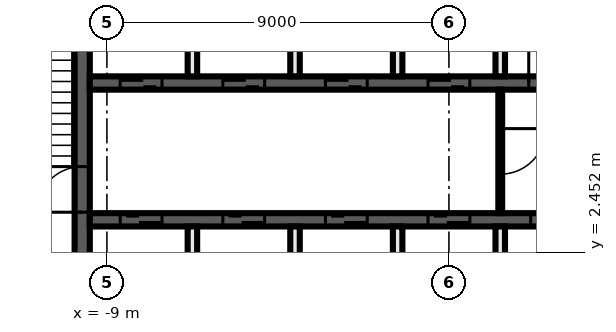
"""IFC4 building model, lengths in metres.
Left out: names, types, materials, properties, quantities, classifications, styles, units other than length and angle.
Written with IfcOpenShell. Run it as: python <this file> out.ifc"""

import sys

from ifc_helpers import new_model, si_unit, direction, frame, frame_2d, origin, place, context, subcontext, project, spatial, rectangle, extrude, element, fill, save


model = new_model("IFC4")
c1 = context("Model", 3, precision=1e-05, world=origin(), true_north=direction((0.0, 1.0)))
c2 = subcontext(c1, "Body", "Model", "MODEL_VIEW")
j1 = project(units=[si_unit("LENGTHUNIT", "METRE"), si_unit("PLANEANGLEUNIT", "RADIAN")], contexts=[c1])
p1 = place(None, origin())
s1 = spatial("IfcSite", under=j1, at=p1, CompositionType="ELEMENT")
p2 = place(p1, origin())
s2 = spatial("IfcBuilding", under=s1, at=p2, CompositionType="ELEMENT")
p3 = place(p2, frame((0.0, 0.0, 84.7)))
s3 = spatial("IfcBuildingStorey", under=s2, at=p3, CompositionType="ELEMENT", Elevation=84.7)
p4 = place(p3, frame((-9.65, 2.3, 0.0), z_axis=(0.0, 0.0, 1.0), x_axis=(0.0, 1.0, 0.0)))
e1 = element("IfcWall", 1, at=p4, inside=s3, PredefinedType="SHEAR", context=c2, shape_type="SweptSolid", body=[
    extrude(rectangle(XDim=7.5, YDim=0.4, at=frame_2d((3.75, 0.0))), origin(), (0.0, 0.0, 1.0), 3.9),
])
p5 = place(p4, frame((1.2, 0.0, 0.0)))
e2 = element("IfcOpeningElement", 2, at=p5, cuts=e1, PredefinedType="OPENING", context=c2, shape_type="SweptSolid", body=[
    extrude(rectangle(XDim=1.2, YDim=2.1, at=frame_2d((0.6, 1.05))), frame((0.0, 0.21, 0.0), z_axis=(0.0, -1.0, 0.0), x_axis=(1.0, 0.0, 0.0)), (0.0, 0.0, 1.0), 0.42),
])
p6 = place(p3, frame((-9.45, 6.9, 0.0), z_axis=(0.0, 0.0, 1.0), x_axis=(1.0, 0.0, 0.0)))
e3 = element("IfcWall", 3, at=p6, inside=s3, PredefinedType="SHEAR", context=c2, shape_type="SweptSolid", body=[
    extrude(rectangle(XDim=18.9, YDim=0.35, at=frame_2d((9.45, 0.0))), origin(), (0.0, 0.0, 1.0), 3.9),
])
p7 = place(p6, frame((0.8, 0.0, 0.0)))
e4 = element("IfcOpeningElement", 4, at=p7, cuts=e3, PredefinedType="OPENING", context=c2, shape_type="SweptSolid", body=[
    extrude(rectangle(XDim=1.1, YDim=2.1, at=frame_2d((0.55, 1.05))), frame((0.0, 0.185, 0.0), z_axis=(0.0, -1.0, 0.0), x_axis=(1.0, 0.0, 0.0)), (0.0, 0.0, 1.0), 0.37),
])
p8 = place(p6, frame((3.5, 0.0, 0.0)))
e5 = element("IfcOpeningElement", 5, at=p8, cuts=e3, PredefinedType="OPENING", context=c2, shape_type="SweptSolid", body=[
    extrude(rectangle(XDim=1.1, YDim=2.1, at=frame_2d((0.55, 1.05))), frame((0.0, 0.185, 0.0), z_axis=(0.0, -1.0, 0.0), x_axis=(1.0, 0.0, 0.0)), (0.0, 0.0, 1.0), 0.37),
])
p9 = place(p6, frame((6.2, 0.0, 0.0)))
e6 = element("IfcOpeningElement", 6, at=p9, cuts=e3, PredefinedType="OPENING", context=c2, shape_type="SweptSolid", body=[
    extrude(rectangle(XDim=1.1, YDim=2.1, at=frame_2d((0.55, 1.05))), frame((0.0, 0.185, 0.0), z_axis=(0.0, -1.0, 0.0), x_axis=(1.0, 0.0, 0.0)), (0.0, 0.0, 1.0), 0.37),
])
p10 = place(p6, frame((8.9, 0.0, 0.0)))
e7 = element("IfcOpeningElement", 7, at=p10, cuts=e3, PredefinedType="OPENING", context=c2, shape_type="SweptSolid", body=[
    extrude(rectangle(XDim=1.1, YDim=2.1, at=frame_2d((0.55, 1.05))), frame((0.0, 0.185, 0.0), z_axis=(0.0, -1.0, 0.0), x_axis=(1.0, 0.0, 0.0)), (0.0, 0.0, 1.0), 0.37),
])
p11 = place(p6, frame((11.55, 0.0, 0.0)))
e8 = element("IfcOpeningElement", 8, at=p11, cuts=e3, PredefinedType="OPENING", context=c2, shape_type="SweptSolid", body=[
    extrude(rectangle(XDim=1.2, YDim=2.1, at=frame_2d((0.6, 1.05))), frame((0.0, 0.185, 0.0), z_axis=(0.0, -1.0, 0.0), x_axis=(1.0, 0.0, 0.0)), (0.0, 0.0, 1.0), 0.37),
])
p12 = place(p6, frame((14.3, 0.0, 0.0)))
e9 = element("IfcOpeningElement", 9, at=p12, cuts=e3, PredefinedType="OPENING", context=c2, shape_type="SweptSolid", body=[
    extrude(rectangle(XDim=1.1, YDim=2.1, at=frame_2d((0.55, 1.05))), frame((0.0, 0.185, 0.0), z_axis=(0.0, -1.0, 0.0), x_axis=(1.0, 0.0, 0.0)), (0.0, 0.0, 1.0), 0.37),
])
p13 = place(p6, frame((17.0, 0.0, 0.0)))
e10 = element("IfcOpeningElement", 10, at=p13, cuts=e3, PredefinedType="OPENING", context=c2, shape_type="SweptSolid", body=[
    extrude(rectangle(XDim=1.1, YDim=2.1, at=frame_2d((0.55, 1.05))), frame((0.0, 0.185, 0.0), z_axis=(0.0, -1.0, 0.0), x_axis=(1.0, 0.0, 0.0)), (0.0, 0.0, 1.0), 0.37),
])
p14 = place(p3, frame((9.45, 3.3, 0.0), z_axis=(0.0, 0.0, 1.0), x_axis=(-1.0, 0.0, 0.0)))
e11 = element("IfcWall", 11, at=p14, inside=s3, PredefinedType="SHEAR", context=c2, shape_type="SweptSolid", body=[
    extrude(rectangle(XDim=18.9, YDim=0.35, at=frame_2d((9.45, 0.0))), origin(), (0.0, 0.0, 1.0), 3.9),
])
p15 = place(p14, frame((17.0, 0.0, 0.0)))
e12 = element("IfcOpeningElement", 12, at=p15, cuts=e11, PredefinedType="OPENING", context=c2, shape_type="SweptSolid", body=[
    extrude(rectangle(XDim=1.1, YDim=2.1, at=frame_2d((0.55, 1.05))), frame((0.0, 0.185, 0.0), z_axis=(0.0, -1.0, 0.0), x_axis=(1.0, 0.0, 0.0)), (0.0, 0.0, 1.0), 0.37),
])
p16 = place(p14, frame((14.3, 0.0, 0.0)))
e13 = element("IfcOpeningElement", 13, at=p16, cuts=e11, PredefinedType="OPENING", context=c2, shape_type="SweptSolid", body=[
    extrude(rectangle(XDim=1.1, YDim=2.1, at=frame_2d((0.55, 1.05))), frame((0.0, 0.185, 0.0), z_axis=(0.0, -1.0, 0.0), x_axis=(1.0, 0.0, 0.0)), (0.0, 0.0, 1.0), 0.37),
])
p17 = place(p14, frame((11.6, 0.0, 0.0)))
e14 = element("IfcOpeningElement", 14, at=p17, cuts=e11, PredefinedType="OPENING", context=c2, shape_type="SweptSolid", body=[
    extrude(rectangle(XDim=1.1, YDim=2.1, at=frame_2d((0.55, 1.05))), frame((0.0, 0.185, 0.0), z_axis=(0.0, -1.0, 0.0), x_axis=(1.0, 0.0, 0.0)), (0.0, 0.0, 1.0), 0.37),
])
p18 = place(p14, frame((8.9, 0.0, 0.0)))
e15 = element("IfcOpeningElement", 15, at=p18, cuts=e11, PredefinedType="OPENING", context=c2, shape_type="SweptSolid", body=[
    extrude(rectangle(XDim=1.1, YDim=2.1, at=frame_2d((0.55, 1.05))), frame((0.0, 0.185, 0.0), z_axis=(0.0, -1.0, 0.0), x_axis=(1.0, 0.0, 0.0)), (0.0, 0.0, 1.0), 0.37),
])
p19 = place(p14, frame((6.2, 0.0, 0.0)))
e16 = element("IfcOpeningElement", 16, at=p19, cuts=e11, PredefinedType="OPENING", context=c2, shape_type="SweptSolid", body=[
    extrude(rectangle(XDim=1.1, YDim=2.1, at=frame_2d((0.55, 1.05))), frame((0.0, 0.185, 0.0), z_axis=(0.0, -1.0, 0.0), x_axis=(1.0, 0.0, 0.0)), (0.0, 0.0, 1.0), 0.37),
])
p20 = place(p14, frame((3.5, 0.0, 0.0)))
e17 = element("IfcOpeningElement", 17, at=p20, cuts=e11, PredefinedType="OPENING", context=c2, shape_type="SweptSolid", body=[
    extrude(rectangle(XDim=1.1, YDim=2.1, at=frame_2d((0.55, 1.05))), frame((0.0, 0.185, 0.0), z_axis=(0.0, -1.0, 0.0), x_axis=(1.0, 0.0, 0.0)), (0.0, 0.0, 1.0), 0.37),
])
p21 = place(p14, frame((0.9, 0.0, 0.0)))
e18 = element("IfcOpeningElement", 18, at=p21, cuts=e11, PredefinedType="OPENING", context=c2, shape_type="SweptSolid", body=[
    extrude(rectangle(XDim=0.9, YDim=2.1, at=frame_2d((0.45, 1.05))), frame((0.0, 0.185, 0.0), z_axis=(0.0, -1.0, 0.0), x_axis=(1.0, 0.0, 0.0)), (0.0, 0.0, 1.0), 0.37),
])
p22 = place(p3, frame((1.35, 6.725, 0.0), z_axis=(0.0, 0.0, 1.0), x_axis=(0.0, -1.0, 0.0)))
e19 = element("IfcWall", 19, at=p22, inside=s3, PredefinedType="PARTITIONING", context=c2, shape_type="SweptSolid", body=[
    extrude(rectangle(XDim=3.25, YDim=0.1, at=frame_2d((1.625, 0.0))), origin(), (0.0, 0.0, 1.0), 3.9),
])
p23 = place(p22, frame((1.025, 0.0, 0.0)))
e20 = element("IfcOpeningElement", 20, at=p23, cuts=e19, PredefinedType="OPENING", context=c2, shape_type="SweptSolid", body=[
    extrude(rectangle(XDim=1.2, YDim=2.1, at=frame_2d((0.6, 1.05))), frame((0.0, 0.06, 0.0), z_axis=(0.0, -1.0, 0.0), x_axis=(1.0, 0.0, 0.0)), (0.0, 0.0, 1.0), 0.12),
])
for number, where, z_axis, x_axis in (
    (21, (1.35, 0.4, 0.0), (0.0, 0.0, 1.0), (0.0, 1.0, 0.0)),
    (22, (1.35, 7.075, 0.0), (0.0, 0.0, 1.0), (0.0, 1.0, 0.0)),
    (23, (-1.35, 0.4, 0.0), (0.0, 0.0, 1.0), (0.0, 1.0, 0.0)),
    (24, (-1.35, 7.075, 0.0), (0.0, 0.0, 1.0), (0.0, 1.0, 0.0)),
    (25, (-4.05, 0.4, 0.0), (0.0, 0.0, 1.0), (0.0, 1.0, 0.0)),
    (26, (-4.05, 7.075, 0.0), (0.0, 0.0, 1.0), (0.0, 1.0, 0.0)),
    (27, (-6.75, 0.4, 0.0), (0.0, 0.0, 1.0), (0.0, 1.0, 0.0)),
    (28, (-6.75, 7.075, 0.0), (0.0, 0.0, 1.0), (0.0, 1.0, 0.0)),
):
    element("IfcWall", number, at=place(p3, frame(where, z_axis=z_axis, x_axis=x_axis)), inside=s3, PredefinedType="SOLIDWALL", context=c2, shape_type="SweptSolid", body=[
        extrude(rectangle(XDim=2.725, YDim=0.25, at=frame_2d((1.363, 0.0))), origin(), (0.0, 0.0, 1.0), 3.9),
    ])
p24 = place(p7, origin())
e29 = element("IfcDoor", 29, at=p24, inside=s3, OperationType="DOUBLE_DOOR_SLIDING", PredefinedType="DOOR", context=c2, shape_type="SweptSolid", body=[
    extrude(rectangle(XDim=1.1, YDim=2.1, at=frame_2d((0.55, 1.05))), frame((0.0, 0.025, 0.0), z_axis=(0.0, -1.0, 0.0), x_axis=(1.0, 0.0, 0.0)), (0.0, 0.0, 1.0), 0.05),
])
fill(e4, e29)
p25 = place(p8, origin())
e30 = element("IfcDoor", 30, at=p25, inside=s3, OperationType="DOUBLE_DOOR_SLIDING", PredefinedType="DOOR", context=c2, shape_type="SweptSolid", body=[
    extrude(rectangle(XDim=1.1, YDim=2.1, at=frame_2d((0.55, 1.05))), frame((0.0, 0.025, 0.0), z_axis=(0.0, -1.0, 0.0), x_axis=(1.0, 0.0, 0.0)), (0.0, 0.0, 1.0), 0.05),
])
fill(e5, e30)
p26 = place(p9, origin())
e31 = element("IfcDoor", 31, at=p26, inside=s3, OperationType="DOUBLE_DOOR_SLIDING", PredefinedType="DOOR", context=c2, shape_type="SweptSolid", body=[
    extrude(rectangle(XDim=1.1, YDim=2.1, at=frame_2d((0.55, 1.05))), frame((0.0, 0.025, 0.0), z_axis=(0.0, -1.0, 0.0), x_axis=(1.0, 0.0, 0.0)), (0.0, 0.0, 1.0), 0.05),
])
fill(e6, e31)
p27 = place(p10, origin())
e32 = element("IfcDoor", 32, at=p27, inside=s3, OperationType="DOUBLE_DOOR_SLIDING", PredefinedType="DOOR", context=c2, shape_type="SweptSolid", body=[
    extrude(rectangle(XDim=1.1, YDim=2.1, at=frame_2d((0.55, 1.05))), frame((0.0, 0.025, 0.0), z_axis=(0.0, -1.0, 0.0), x_axis=(1.0, 0.0, 0.0)), (0.0, 0.0, 1.0), 0.05),
])
fill(e7, e32)
p28 = place(p11, origin())
e33 = element("IfcDoor", 33, at=p28, inside=s3, OperationType="SINGLE_SWING_LEFT", PredefinedType="DOOR", context=c2, shape_type="SweptSolid", body=[
    extrude(rectangle(XDim=1.2, YDim=2.1, at=frame_2d((0.6, 1.05))), frame((0.0, 0.025, 0.0), z_axis=(0.0, -1.0, 0.0), x_axis=(1.0, 0.0, 0.0)), (0.0, 0.0, 1.0), 0.05),
])
fill(e8, e33)
p29 = place(p15, origin())
e34 = element("IfcDoor", 34, at=p29, inside=s3, OperationType="DOUBLE_DOOR_SLIDING", PredefinedType="DOOR", context=c2, shape_type="SweptSolid", body=[
    extrude(rectangle(XDim=1.1, YDim=2.1, at=frame_2d((0.55, 1.05))), frame((0.0, 0.025, 0.0), z_axis=(0.0, -1.0, 0.0), x_axis=(1.0, 0.0, 0.0)), (0.0, 0.0, 1.0), 0.05),
])
fill(e12, e34)
p30 = place(p16, origin())
e35 = element("IfcDoor", 35, at=p30, inside=s3, OperationType="DOUBLE_DOOR_SLIDING", PredefinedType="DOOR", context=c2, shape_type="SweptSolid", body=[
    extrude(rectangle(XDim=1.1, YDim=2.1, at=frame_2d((0.55, 1.05))), frame((0.0, 0.025, 0.0), z_axis=(0.0, -1.0, 0.0), x_axis=(1.0, 0.0, 0.0)), (0.0, 0.0, 1.0), 0.05),
])
fill(e13, e35)
p31 = place(p17, origin())
e36 = element("IfcDoor", 36, at=p31, inside=s3, OperationType="DOUBLE_DOOR_SLIDING", PredefinedType="DOOR", context=c2, shape_type="SweptSolid", body=[
    extrude(rectangle(XDim=1.1, YDim=2.1, at=frame_2d((0.55, 1.05))), frame((0.0, 0.025, 0.0), z_axis=(0.0, -1.0, 0.0), x_axis=(1.0, 0.0, 0.0)), (0.0, 0.0, 1.0), 0.05),
])
fill(e14, e36)
p32 = place(p18, origin())
e37 = element("IfcDoor", 37, at=p32, inside=s3, OperationType="DOUBLE_DOOR_SLIDING", PredefinedType="DOOR", context=c2, shape_type="SweptSolid", body=[
    extrude(rectangle(XDim=1.1, YDim=2.1, at=frame_2d((0.55, 1.05))), frame((0.0, 0.025, 0.0), z_axis=(0.0, -1.0, 0.0), x_axis=(1.0, 0.0, 0.0)), (0.0, 0.0, 1.0), 0.05),
])
fill(e15, e37)
p33 = place(p19, origin())
e38 = element("IfcDoor", 38, at=p33, inside=s3, OperationType="DOUBLE_DOOR_SLIDING", PredefinedType="DOOR", context=c2, shape_type="SweptSolid", body=[
    extrude(rectangle(XDim=1.1, YDim=2.1, at=frame_2d((0.55, 1.05))), frame((0.0, 0.025, 0.0), z_axis=(0.0, -1.0, 0.0), x_axis=(1.0, 0.0, 0.0)), (0.0, 0.0, 1.0), 0.05),
])
fill(e16, e38)
p34 = place(p5, origin())
e39 = element("IfcDoor", 39, at=p34, inside=s3, OperationType="SINGLE_SWING_RIGHT", PredefinedType="DOOR", context=c2, shape_type="SweptSolid", body=[
    extrude(rectangle(XDim=1.2, YDim=2.1, at=frame_2d((0.6, 1.05))), frame((0.0, 0.025, 0.0), z_axis=(0.0, -1.0, 0.0), x_axis=(1.0, 0.0, 0.0)), (0.0, 0.0, 1.0), 0.05),
])
fill(e2, e39)
p35 = place(p23, origin())
e40 = element("IfcDoor", 40, at=p35, inside=s3, OperationType="SINGLE_SWING_LEFT", PredefinedType="DOOR", context=c2, shape_type="SweptSolid", body=[
    extrude(rectangle(XDim=1.2, YDim=2.1, at=frame_2d((0.6, 1.05))), frame((0.0, 0.025, 0.0), z_axis=(0.0, -1.0, 0.0), x_axis=(1.0, 0.0, 0.0)), (0.0, 0.0, 1.0), 0.05),
])
fill(e20, e40)
save(model, sys.argv[1])
